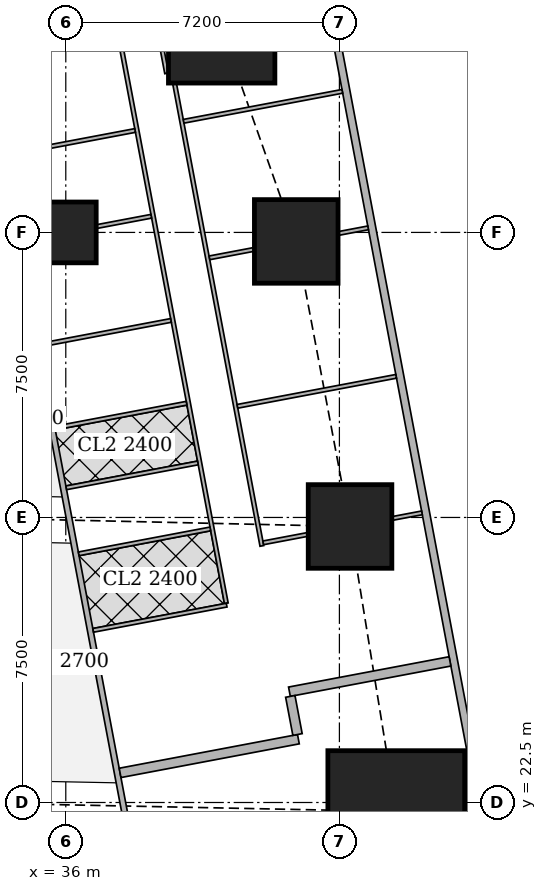
"""IFC4 building model, lengths in metres.
Left out: names, types, materials, properties, quantities, classifications, styles, units other than length and angle.
Written with IfcOpenShell. Run it as: python <this file> out.ifc"""

import sys

from ifc_helpers import new_model, si_unit, direction, frame, frame_2d, origin, origin_2d, place, context, subcontext, project, spatial, rectangle, extrude, element, fill, save


model = new_model("IFC4")
c1 = context("Model", 3, precision=1e-05, world=origin(), true_north=direction((0.0, 1.0)))
c2 = subcontext(c1, "Body", "Model", "MODEL_VIEW")
j1 = project(units=[si_unit("LENGTHUNIT", "METRE"), si_unit("PLANEANGLEUNIT", "RADIAN")], contexts=[c1])
p1 = place(None, origin())
s1 = spatial("IfcSite", under=j1, at=p1, CompositionType="ELEMENT")
p2 = place(p1, origin())
s2 = spatial("IfcBuilding", under=s1, at=p2, CompositionType="ELEMENT")
p3 = place(p2, frame((0.0, 0.0, 111.65)))
s3 = spatial("IfcBuildingStorey", under=s2, at=p3, CompositionType="ELEMENT", Elevation=111.65)
p4 = place(p3, frame((44.697, 22.263, 0.0), z_axis=(0.0, 0.0, 1.0), x_axis=(1.0, 0.0, 0.0)))
e1 = element("IfcColumn", 1, at=p4, inside=s3, PredefinedType="COLUMN", context=c2, shape_type="SweptSolid", body=[
    extrude(rectangle(XDim=3.6, YDim=3.2, at=origin_2d()), origin(), (0.0, 0.0, 1.0), 3.75),
])
p5 = place(p3, frame((43.48, 29.763, 0.0), z_axis=(0.0, 0.0, 1.0), x_axis=(1.0, 0.0, 0.0)))
e2 = element("IfcColumn", 2, at=p5, inside=s3, PredefinedType="COLUMN", context=c2, shape_type="SweptSolid", body=[
    extrude(rectangle(XDim=2.2, YDim=2.2, at=origin_2d()), origin(), (0.0, 0.0, 1.0), 3.75),
])
p6 = place(p3, frame((36.0, 37.5, 0.0), z_axis=(0.0, 0.0, 1.0), x_axis=(1.0, 0.0, 0.0)))
e3 = element("IfcColumn", 3, at=p6, inside=s3, PredefinedType="COLUMN", context=c2, shape_type="SweptSolid", body=[
    extrude(rectangle(XDim=1.6, YDim=1.6, at=origin_2d()), origin(), (0.0, 0.0, 1.0), 3.75),
])
p7 = place(p3, frame((42.064, 37.263, 0.0), z_axis=(0.0, 0.0, 1.0), x_axis=(1.0, 0.0, 0.0)))
e4 = element("IfcColumn", 4, at=p7, inside=s3, PredefinedType="COLUMN", context=c2, shape_type="SweptSolid", body=[
    extrude(rectangle(XDim=2.2, YDim=2.2, at=origin_2d()), origin(), (0.0, 0.0, 1.0), 3.75),
])
p8 = place(p3, frame((40.102, 42.83, 0.0), z_axis=(0.0, 0.0, 1.0), x_axis=(1.0, 0.0, 0.0)))
e5 = element("IfcColumn", 5, at=p8, inside=s3, PredefinedType="COLUMN", context=c2, shape_type="SweptSolid", body=[
    extrude(rectangle(XDim=2.8, YDim=2.8, at=origin_2d()), origin(), (0.0, 0.0, 1.0), 3.75),
])
p9 = place(p3, frame((50.653, 2.703, 0.0), z_axis=(0.0, 0.0, 1.0), x_axis=(-0.185612026696, 0.982623109613, 0.0)))
e6 = element("IfcWall", 6, at=p9, inside=s3, PredefinedType="SOLIDWALL", context=c2, shape_type="SweptSolid", body=[
    extrude(rectangle(XDim=41.393, YDim=0.2, at=frame_2d((20.697, 0.0))), origin(), (0.0, 0.0, 1.0), 3.5),
])
p10 = place(p9, frame((1.633, 0.0, 0.9)))
e7 = element("IfcOpeningElement", 7, at=p10, cuts=e6, PredefinedType="OPENING", context=c2, shape_type="SweptSolid", body=[
    extrude(rectangle(XDim=1.8, YDim=1.5, at=frame_2d((0.9, 0.75))), frame((0.0, 0.11, 0.0), z_axis=(0.0, -1.0, 0.0), x_axis=(1.0, 0.0, 0.0)), (0.0, 0.0, 1.0), 0.22),
])
p11 = place(p9, frame((6.032, 0.0, 0.9)))
e8 = element("IfcOpeningElement", 8, at=p11, cuts=e6, PredefinedType="OPENING", context=c2, shape_type="SweptSolid", body=[
    extrude(rectangle(XDim=1.8, YDim=1.5, at=frame_2d((0.9, 0.75))), frame((0.0, 0.11, 0.0), z_axis=(0.0, -1.0, 0.0), x_axis=(1.0, 0.0, 0.0)), (0.0, 0.0, 1.0), 0.22),
])
p12 = place(p9, frame((9.848, 0.0, 0.9)))
e9 = element("IfcOpeningElement", 9, at=p12, cuts=e6, PredefinedType="OPENING", context=c2, shape_type="SweptSolid", body=[
    extrude(rectangle(XDim=1.8, YDim=1.5, at=frame_2d((0.9, 0.75))), frame((0.0, 0.11, 0.0), z_axis=(0.0, -1.0, 0.0), x_axis=(1.0, 0.0, 0.0)), (0.0, 0.0, 1.0), 0.22),
])
p13 = place(p9, frame((13.664, 0.0, 0.9)))
e10 = element("IfcOpeningElement", 10, at=p13, cuts=e6, PredefinedType="OPENING", context=c2, shape_type="SweptSolid", body=[
    extrude(rectangle(XDim=1.8, YDim=1.5, at=frame_2d((0.9, 0.75))), frame((0.0, 0.11, 0.0), z_axis=(0.0, -1.0, 0.0), x_axis=(1.0, 0.0, 0.0)), (0.0, 0.0, 1.0), 0.22),
])
p14 = place(p9, frame((17.481, 0.0, 0.9)))
e11 = element("IfcOpeningElement", 11, at=p14, cuts=e6, PredefinedType="OPENING", context=c2, shape_type="SweptSolid", body=[
    extrude(rectangle(XDim=1.8, YDim=1.5, at=frame_2d((0.9, 0.75))), frame((0.0, 0.11, 0.0), z_axis=(0.0, -1.0, 0.0), x_axis=(1.0, 0.0, 0.0)), (0.0, 0.0, 1.0), 0.22),
])
p15 = place(p9, frame((21.297, 0.0, 0.9)))
e12 = element("IfcOpeningElement", 12, at=p15, cuts=e6, PredefinedType="OPENING", context=c2, shape_type="SweptSolid", body=[
    extrude(rectangle(XDim=1.8, YDim=1.5, at=frame_2d((0.9, 0.75))), frame((0.0, 0.11, 0.0), z_axis=(0.0, -1.0, 0.0), x_axis=(1.0, 0.0, 0.0)), (0.0, 0.0, 1.0), 0.22),
])
p16 = place(p9, frame((25.113, 0.0, 0.9)))
e13 = element("IfcOpeningElement", 13, at=p16, cuts=e6, PredefinedType="OPENING", context=c2, shape_type="SweptSolid", body=[
    extrude(rectangle(XDim=1.8, YDim=1.5, at=frame_2d((0.9, 0.75))), frame((0.0, 0.11, 0.0), z_axis=(0.0, -1.0, 0.0), x_axis=(1.0, 0.0, 0.0)), (0.0, 0.0, 1.0), 0.22),
])
p17 = place(p9, frame((28.93, 0.0, 0.9)))
e14 = element("IfcOpeningElement", 14, at=p17, cuts=e6, PredefinedType="OPENING", context=c2, shape_type="SweptSolid", body=[
    extrude(rectangle(XDim=1.8, YDim=1.5, at=frame_2d((0.9, 0.75))), frame((0.0, 0.11, 0.0), z_axis=(0.0, -1.0, 0.0), x_axis=(1.0, 0.0, 0.0)), (0.0, 0.0, 1.0), 0.22),
])
p18 = place(p9, frame((32.746, 0.0, 0.9)))
e15 = element("IfcOpeningElement", 15, at=p18, cuts=e6, PredefinedType="OPENING", context=c2, shape_type="SweptSolid", body=[
    extrude(rectangle(XDim=1.8, YDim=1.5, at=frame_2d((0.9, 0.75))), frame((0.0, 0.11, 0.0), z_axis=(0.0, -1.0, 0.0), x_axis=(1.0, 0.0, 0.0)), (0.0, 0.0, 1.0), 0.22),
])
p19 = place(p9, frame((36.481, 0.0, 0.9)))
e16 = element("IfcOpeningElement", 16, at=p19, cuts=e6, PredefinedType="OPENING", context=c2, shape_type="SweptSolid", body=[
    extrude(rectangle(XDim=1.8, YDim=1.5, at=frame_2d((0.9, 0.75))), frame((0.0, 0.11, 0.0), z_axis=(0.0, -1.0, 0.0), x_axis=(1.0, 0.0, 0.0)), (0.0, 0.0, 1.0), 0.22),
])
p20 = place(p3, frame((33.127, 45.65, 0.0), z_axis=(0.0, 0.0, 1.0), x_axis=(0.185598547723, -0.98262565562, 0.0)))
e17 = element("IfcWall", 17, at=p20, inside=s3, PredefinedType="SOLIDWALL", context=c2, shape_type="SweptSolid", body=[
    extrude(rectangle(XDim=47.118, YDim=0.15, at=frame_2d((23.559, 0.0))), origin(), (0.0, 0.0, 1.0), 2.2),
])
p21 = place(p20, frame((20.373, 0.0, 0.0)))
e18 = element("IfcOpeningElement", 18, at=p21, cuts=e17, PredefinedType="OPENING", context=c2, shape_type="SweptSolid", body=[
    extrude(rectangle(XDim=1.0, YDim=2.1, at=frame_2d((0.5, 1.05))), frame((0.0, 0.085, 0.0), z_axis=(0.0, -1.0, 0.0), x_axis=(1.0, 0.0, 0.0)), (0.0, 0.0, 1.0), 0.17),
])
p22 = place(p20, frame((24.188, 0.0, 0.0)))
e19 = element("IfcOpeningElement", 19, at=p22, cuts=e17, PredefinedType="OPENING", context=c2, shape_type="SweptSolid", body=[
    extrude(rectangle(XDim=1.0, YDim=2.1, at=frame_2d((0.5, 1.05))), frame((0.0, 0.085, 0.0), z_axis=(0.0, -1.0, 0.0), x_axis=(1.0, 0.0, 0.0)), (0.0, 0.0, 1.0), 0.17),
])
p23 = place(p20, frame((32.608, 0.0, 0.0)))
e20 = element("IfcOpeningElement", 20, at=p23, cuts=e17, PredefinedType="OPENING", context=c2, shape_type="SweptSolid", body=[
    extrude(rectangle(XDim=1.0, YDim=2.1, at=frame_2d((0.5, 1.05))), frame((0.0, 0.085, 0.0), z_axis=(0.0, -1.0, 0.0), x_axis=(1.0, 0.0, 0.0)), (0.0, 0.0, 1.0), 0.17),
])
p24 = place(p3, frame((38.654, 41.686, 0.0), z_axis=(0.0, 0.0, 1.0), x_axis=(-0.185676896978, 0.982610853761, 0.0)))
e21 = element("IfcWall", 21, at=p24, inside=s3, PredefinedType="PARTITIONING", context=c2, shape_type="SweptSolid", body=[
    extrude(rectangle(XDim=4.034, YDim=0.1, at=frame_2d((2.017, 0.0))), origin(), (0.0, 0.0, 1.0), 2.05),
])
p25 = place(p3, frame((38.862, 41.42, 0.0), z_axis=(0.0, 0.0, 1.0), x_axis=(0.185550092293, -0.982634806655, 0.0)))
e22 = element("IfcWall", 22, at=p25, inside=s3, PredefinedType="PARTITIONING", context=c2, shape_type="SweptSolid", body=[
    extrude(rectangle(XDim=12.384, YDim=0.1, at=frame_2d((6.192, 0.0))), origin(), (0.0, 0.0, 1.0), 2.5),
])
p26 = place(p25, frame((11.212, 0.0, 0.0)))
e23 = element("IfcOpeningElement", 23, at=p26, cuts=e22, PredefinedType="OPENING", context=c2, shape_type="SweptSolid", body=[
    extrude(rectangle(XDim=0.9, YDim=2.1, at=frame_2d((0.45, 1.05))), frame((0.0, 0.06, 0.0), z_axis=(0.0, -1.0, 0.0), x_axis=(1.0, 0.0, 0.0)), (0.0, 0.0, 1.0), 0.12),
])
p27 = place(p25, frame((7.555, 0.0, 0.0)))
e24 = element("IfcOpeningElement", 24, at=p27, cuts=e22, PredefinedType="OPENING", context=c2, shape_type="SweptSolid", body=[
    extrude(rectangle(XDim=0.9, YDim=2.1, at=frame_2d((0.45, 1.05))), frame((0.0, 0.06, 0.0), z_axis=(0.0, -1.0, 0.0), x_axis=(1.0, 0.0, 0.0)), (0.0, 0.0, 1.0), 0.12),
])
p28 = place(p25, frame((3.579, 0.0, 0.0)))
e25 = element("IfcOpeningElement", 25, at=p28, cuts=e22, PredefinedType="OPENING", context=c2, shape_type="SweptSolid", body=[
    extrude(rectangle(XDim=0.9, YDim=2.1, at=frame_2d((0.45, 1.05))), frame((0.0, 0.06, 0.0), z_axis=(0.0, -1.0, 0.0), x_axis=(1.0, 0.0, 0.0)), (0.0, 0.0, 1.0), 0.12),
])
p29 = place(p3, frame((37.473, 42.309, 0.0), z_axis=(0.0, 0.0, 1.0), x_axis=(0.185583982986, -0.982628406499, 0.0)))
e26 = element("IfcWall", 26, at=p29, inside=s3, PredefinedType="PARTITIONING", context=c2, shape_type="SweptSolid", body=[
    extrude(rectangle(XDim=14.825, YDim=0.1, at=frame_2d((7.412, 0.0))), origin(), (0.0, 0.0, 1.0), 2.5),
])
p30 = place(p29, frame((13.4, 0.0, 0.0)))
e27 = element("IfcOpeningElement", 27, at=p30, cuts=e26, PredefinedType="OPENING", context=c2, shape_type="SweptSolid", body=[
    extrude(rectangle(XDim=0.9, YDim=2.1, at=frame_2d((0.45, 1.05))), frame((0.0, 0.06, 0.0), z_axis=(0.0, -1.0, 0.0), x_axis=(1.0, 0.0, 0.0)), (0.0, 0.0, 1.0), 0.12),
])
p31 = place(p29, frame((9.808, 0.0, 0.0)))
e28 = element("IfcOpeningElement", 28, at=p31, cuts=e26, PredefinedType="OPENING", context=c2, shape_type="SweptSolid", body=[
    extrude(rectangle(XDim=0.9, YDim=2.1, at=frame_2d((0.45, 1.05))), frame((0.0, 0.06, 0.0), z_axis=(0.0, -1.0, 0.0), x_axis=(1.0, 0.0, 0.0)), (0.0, 0.0, 1.0), 0.12),
])
p32 = place(p29, frame((5.397, 0.0, 0.0)))
e29 = element("IfcOpeningElement", 29, at=p32, cuts=e26, PredefinedType="OPENING", context=c2, shape_type="SweptSolid", body=[
    extrude(rectangle(XDim=0.9, YDim=2.1, at=frame_2d((0.45, 1.05))), frame((0.0, 0.06, 0.0), z_axis=(0.0, -1.0, 0.0), x_axis=(1.0, 0.0, 0.0)), (0.0, 0.0, 1.0), 0.12),
])
p33 = place(p29, frame((2.853, 0.0, 0.0)))
e30 = element("IfcOpeningElement", 30, at=p33, cuts=e26, PredefinedType="OPENING", context=c2, shape_type="SweptSolid", body=[
    extrude(rectangle(XDim=0.9, YDim=2.1, at=frame_2d((0.45, 1.05))), frame((0.0, 0.06, 0.0), z_axis=(0.0, -1.0, 0.0), x_axis=(1.0, 0.0, 0.0)), (0.0, 0.0, 1.0), 0.12),
])
p34 = place(p29, frame((11.491, 0.0, 0.0)))
e31 = element("IfcOpeningElement", 31, at=p34, cuts=e26, PredefinedType="OPENING", context=c2, shape_type="SweptSolid", body=[
    extrude(rectangle(XDim=0.9, YDim=2.1, at=frame_2d((0.45, 1.05))), frame((0.0, 0.06, 0.0), z_axis=(0.0, -1.0, 0.0), x_axis=(1.0, 0.0, 0.0)), (0.0, 0.0, 1.0), 0.12),
])
p35 = place(p29, frame((7.9, 0.0, 0.0)))
e32 = element("IfcOpeningElement", 32, at=p35, cuts=e26, PredefinedType="OPENING", context=c2, shape_type="SweptSolid", body=[
    extrude(rectangle(XDim=0.9, YDim=2.1, at=frame_2d((0.45, 1.05))), frame((0.0, 0.06, 0.0), z_axis=(0.0, -1.0, 0.0), x_axis=(1.0, 0.0, 0.0)), (0.0, 0.0, 1.0), 0.12),
])
p36 = place(p3, frame((43.277, 41.212, 0.0), z_axis=(0.0, 0.0, 1.0), x_axis=(-0.982665405803, -0.185387972203, 0.0)))
e33 = element("IfcWall", 33, at=p36, inside=s3, PredefinedType="PARTITIONING", context=c2, shape_type="SweptSolid", body=[
    extrude(rectangle(XDim=4.25, YDim=0.1, at=frame_2d((2.125, 0.0))), origin(), (0.0, 0.0, 1.0), 2.05),
])
p37 = place(p3, frame((43.955, 37.62, 0.0), z_axis=(0.0, 0.0, 1.0), x_axis=(-0.98247004097, -0.186420542316, 0.0)))
e34 = element("IfcWall", 34, at=p37, inside=s3, PredefinedType="PARTITIONING", context=c2, shape_type="SweptSolid", body=[
    extrude(rectangle(XDim=0.795, YDim=0.1, at=frame_2d((0.397, 0.0))), origin(), (0.0, 0.0, 1.0), 2.05),
])
p38 = place(p3, frame((40.954, 37.053, 0.0), z_axis=(0.0, 0.0, 1.0), x_axis=(-0.982600492424, -0.185731721275, 0.0)))
e35 = element("IfcWall", 35, at=p38, inside=s3, PredefinedType="PARTITIONING", context=c2, shape_type="SweptSolid", body=[
    extrude(rectangle(XDim=1.195, YDim=0.1, at=frame_2d((0.597, 0.0))), origin(), (0.0, 0.0, 1.0), 2.05),
])
p39 = place(p3, frame((44.693, 33.713, 0.0), z_axis=(0.0, 0.0, 1.0), x_axis=(-0.982623519589, -0.185609856287, 0.0)))
e36 = element("IfcWall", 36, at=p39, inside=s3, PredefinedType="PARTITIONING", context=c2, shape_type="SweptSolid", body=[
    extrude(rectangle(XDim=4.25, YDim=0.1, at=frame_2d((2.125, 0.0))), origin(), (0.0, 0.0, 1.0), 2.2),
])
p40 = place(p3, frame((45.372, 30.121, 0.0), z_axis=(0.0, 0.0, 1.0), x_axis=(-0.982512656401, -0.186195810938, 0.0)))
e37 = element("IfcWall", 37, at=p40, inside=s3, PredefinedType="PARTITIONING", context=c2, shape_type="SweptSolid", body=[
    extrude(rectangle(XDim=0.796, YDim=0.1, at=frame_2d((0.398, 0.0))), origin(), (0.0, 0.0, 1.0), 3.5),
])
p41 = place(p3, frame((42.37, 29.554, 0.0), z_axis=(0.0, 0.0, 1.0), x_axis=(-0.982600492424, -0.185731721275, 0.0)))
e38 = element("IfcWall", 38, at=p41, inside=s3, PredefinedType="PARTITIONING", context=c2, shape_type="SweptSolid", body=[
    extrude(rectangle(XDim=1.195, YDim=0.1, at=frame_2d((0.597, 0.0))), origin(), (0.0, 0.0, 1.0), 2.5),
])
p42 = place(p3, frame((37.824, 40.182, 0.0), z_axis=(0.0, 0.0, 1.0), x_axis=(-0.982648794755, -0.185475998897, 0.0)))
e39 = element("IfcWall", 39, at=p42, inside=s3, PredefinedType="PARTITIONING", context=c2, shape_type="SweptSolid", body=[
    extrude(rectangle(XDim=3.525, YDim=0.1, at=frame_2d((1.763, 0.0))), origin(), (0.0, 0.0, 1.0), 3.5),
])
p43 = place(p3, frame((38.25, 37.925, 0.0), z_axis=(0.0, 0.0, 1.0), x_axis=(-0.982626127294, -0.185596050493, 0.0)))
e40 = element("IfcWall", 40, at=p43, inside=s3, PredefinedType="PARTITIONING", context=c2, shape_type="SweptSolid", body=[
    extrude(rectangle(XDim=1.465, YDim=0.1, at=frame_2d((0.733, 0.0))), origin(), (0.0, 0.0, 1.0), 3.5),
])
p44 = place(p3, frame((39.476, 31.434, 0.0), z_axis=(0.0, 0.0, 1.0), x_axis=(-0.982638553676, -0.185530247748, 0.0)))
e41 = element("IfcWall", 41, at=p44, inside=s3, PredefinedType="PARTITIONING", context=c2, shape_type="SweptSolid", body=[
    extrude(rectangle(XDim=3.525, YDim=0.1, at=frame_2d((1.763, 0.0))), origin(), (0.0, 0.0, 1.0), 3.5),
])
p45 = place(p3, frame((40.233, 27.693, 0.0), z_axis=(0.0, 0.0, 1.0), x_axis=(-0.982598214409, -0.185743772548, 0.0)))
e42 = element("IfcWall", 42, at=p45, inside=s3, PredefinedType="PARTITIONING", context=c2, shape_type="SweptSolid", body=[
    extrude(rectangle(XDim=3.575, YDim=0.1, at=frame_2d((1.788, 0.0))), origin(), (0.0, 0.0, 1.0), 3.5),
])
p46 = place(p3, frame((38.768, 35.184, 0.0), z_axis=(0.0, 0.0, 1.0), x_axis=(-0.982588017646, -0.185797706064, 0.0)))
e43 = element("IfcWall", 43, at=p46, inside=s3, PredefinedType="PARTITIONING", context=c2, shape_type="SweptSolid", body=[
    extrude(rectangle(XDim=3.525, YDim=0.1, at=frame_2d((1.763, 0.0))), origin(), (0.0, 0.0, 1.0), 3.5),
])
p47 = place(p3, frame((39.803, 29.698, 0.0), z_axis=(0.0, 0.0, 1.0), x_axis=(-0.982576058723, -0.185860939478, 0.0)))
e44 = element("IfcWall", 44, at=p47, inside=s3, PredefinedType="PARTITIONING", context=c2, shape_type="SweptSolid", body=[
    extrude(rectangle(XDim=3.524, YDim=0.1, at=frame_2d((1.762, 0.0))), origin(), (0.0, 0.0, 1.0), 2.5),
])
p48 = place(p3, frame((39.179, 33.006, 0.0), z_axis=(0.0, 0.0, 1.0), x_axis=(-0.982636169624, -0.185542874149, 0.0)))
e45 = element("IfcWall", 45, at=p48, inside=s3, PredefinedType="PARTITIONING", context=c2, shape_type="SweptSolid", body=[
    extrude(rectangle(XDim=3.525, YDim=0.1, at=frame_2d((1.763, 0.0))), origin(), (0.0, 0.0, 1.0), 3.5),
])
p49 = place(p3, frame((46.782, 22.657, 0.0), z_axis=(0.0, 0.0, 1.0), x_axis=(-0.982574553168, -0.185868898601, 0.0)))
e46 = element("IfcWall", 46, at=p49, inside=s3, PredefinedType="PARTITIONING", context=c2, shape_type="SweptSolid", body=[
    extrude(rectangle(XDim=0.28, YDim=0.1, at=frame_2d((0.14, 0.0))), origin(), (0.0, 0.0, 1.0), 3.5),
])
p50 = place(p3, frame((46.11, 26.213, 0.0), z_axis=(0.0, 0.0, 1.0), x_axis=(-0.982633535512, -0.185556823879, 0.0)))
e47 = element("IfcWall", 47, at=p50, inside=s3, PredefinedType="SOLIDWALL", context=c2, shape_type="SweptSolid", body=[
    extrude(rectangle(XDim=4.3, YDim=0.25, at=frame_2d((2.15, 0.0))), origin(), (0.0, 0.0, 1.0), 2.2),
])
p51 = place(p3, frame((42.121, 24.166, 0.0), z_axis=(0.0, 0.0, 1.0), x_axis=(-0.98259850169, -0.185742252804, 0.0)))
e48 = element("IfcWall", 48, at=p51, inside=s3, PredefinedType="SOLIDWALL", context=c2, shape_type="SweptSolid", body=[
    extrude(rectangle(XDim=4.775, YDim=0.25, at=frame_2d((2.388, 0.0))), origin(), (0.0, 0.0, 1.0), 3.5),
])
p52 = place(p3, frame((41.908, 25.292, 0.0), z_axis=(0.0, 0.0, 1.0), x_axis=(0.18607888991, -0.982534806879, 0.0)))
e49 = element("IfcWall", 49, at=p52, inside=s3, PredefinedType="SOLIDWALL", context=c2, shape_type="SweptSolid", body=[
    extrude(rectangle(XDim=1.021, YDim=0.25, at=frame_2d((0.51, 0.0))), origin(), (0.0, 0.0, 1.0), 3.5),
])
p53 = place(p15, origin())
e50 = element("IfcWindow", 50, at=p53, inside=s3, PartitioningType="SINGLE_PANEL", PredefinedType="WINDOW", context=c2, shape_type="SweptSolid", body=[
    extrude(rectangle(XDim=1.8, YDim=1.5, at=frame_2d((0.9, 0.75))), frame((0.0, 0.03, 0.0), z_axis=(0.0, -1.0, 0.0), x_axis=(1.0, 0.0, 0.0)), (0.0, 0.0, 1.0), 0.06),
])
fill(e12, e50)
p54 = place(p16, origin())
e51 = element("IfcWindow", 51, at=p54, inside=s3, PartitioningType="SINGLE_PANEL", PredefinedType="WINDOW", context=c2, shape_type="SweptSolid", body=[
    extrude(rectangle(XDim=1.8, YDim=1.5, at=frame_2d((0.9, 0.75))), frame((0.0, 0.03, 0.0), z_axis=(0.0, -1.0, 0.0), x_axis=(1.0, 0.0, 0.0)), (0.0, 0.0, 1.0), 0.06),
])
fill(e13, e51)
p55 = place(p17, origin())
e52 = element("IfcWindow", 52, at=p55, inside=s3, PartitioningType="SINGLE_PANEL", PredefinedType="WINDOW", context=c2, shape_type="SweptSolid", body=[
    extrude(rectangle(XDim=1.8, YDim=1.5, at=frame_2d((0.9, 0.75))), frame((0.0, 0.03, 0.0), z_axis=(0.0, -1.0, 0.0), x_axis=(1.0, 0.0, 0.0)), (0.0, 0.0, 1.0), 0.06),
])
fill(e14, e52)
p56 = place(p18, origin())
e53 = element("IfcWindow", 53, at=p56, inside=s3, PartitioningType="SINGLE_PANEL", PredefinedType="WINDOW", context=c2, shape_type="SweptSolid", body=[
    extrude(rectangle(XDim=1.8, YDim=1.5, at=frame_2d((0.9, 0.75))), frame((0.0, 0.03, 0.0), z_axis=(0.0, -1.0, 0.0), x_axis=(1.0, 0.0, 0.0)), (0.0, 0.0, 1.0), 0.06),
])
fill(e15, e53)
p57 = place(p19, origin())
e54 = element("IfcWindow", 54, at=p57, inside=s3, PartitioningType="SINGLE_PANEL", PredefinedType="WINDOW", context=c2, shape_type="SweptSolid", body=[
    extrude(rectangle(XDim=1.8, YDim=1.5, at=frame_2d((0.9, 0.75))), frame((0.0, 0.03, 0.0), z_axis=(0.0, -1.0, 0.0), x_axis=(1.0, 0.0, 0.0)), (0.0, 0.0, 1.0), 0.06),
])
fill(e16, e54)
p58 = place(p26, origin())
e55 = element("IfcDoor", 55, at=p58, inside=s3, OperationType="SINGLE_SWING_RIGHT", PredefinedType="DOOR", context=c2, shape_type="SweptSolid", body=[
    extrude(rectangle(XDim=0.9, YDim=2.1, at=frame_2d((0.45, 1.05))), frame((0.0, 0.025, 0.0), z_axis=(0.0, -1.0, 0.0), x_axis=(1.0, 0.0, 0.0)), (0.0, 0.0, 1.0), 0.05),
])
fill(e23, e55)
p59 = place(p27, origin())
e56 = element("IfcDoor", 56, at=p59, inside=s3, OperationType="SINGLE_SWING_RIGHT", PredefinedType="DOOR", context=c2, shape_type="SweptSolid", body=[
    extrude(rectangle(XDim=0.9, YDim=2.1, at=frame_2d((0.45, 1.05))), frame((0.0, 0.025, 0.0), z_axis=(0.0, -1.0, 0.0), x_axis=(1.0, 0.0, 0.0)), (0.0, 0.0, 1.0), 0.05),
])
fill(e24, e56)
p60 = place(p28, origin())
e57 = element("IfcDoor", 57, at=p60, inside=s3, OperationType="SINGLE_SWING_RIGHT", PredefinedType="DOOR", context=c2, shape_type="SweptSolid", body=[
    extrude(rectangle(XDim=0.9, YDim=2.1, at=frame_2d((0.45, 1.05))), frame((0.0, 0.025, 0.0), z_axis=(0.0, -1.0, 0.0), x_axis=(1.0, 0.0, 0.0)), (0.0, 0.0, 1.0), 0.05),
])
fill(e25, e57)
p61 = place(p30, origin())
e58 = element("IfcDoor", 58, at=p61, inside=s3, OperationType="SINGLE_SWING_LEFT", PredefinedType="DOOR", context=c2, shape_type="SweptSolid", body=[
    extrude(rectangle(XDim=0.9, YDim=2.1, at=frame_2d((0.45, 1.05))), frame((0.0, 0.025, 0.0), z_axis=(0.0, -1.0, 0.0), x_axis=(1.0, 0.0, 0.0)), (0.0, 0.0, 1.0), 0.05),
])
fill(e27, e58)
p62 = place(p31, origin())
e59 = element("IfcDoor", 59, at=p62, inside=s3, OperationType="SINGLE_SWING_LEFT", PredefinedType="DOOR", context=c2, shape_type="SweptSolid", body=[
    extrude(rectangle(XDim=0.9, YDim=2.1, at=frame_2d((0.45, 1.05))), frame((0.0, 0.025, 0.0), z_axis=(0.0, -1.0, 0.0), x_axis=(1.0, 0.0, 0.0)), (0.0, 0.0, 1.0), 0.05),
])
fill(e28, e59)
p63 = place(p32, origin())
e60 = element("IfcDoor", 60, at=p63, inside=s3, OperationType="SINGLE_SWING_LEFT", PredefinedType="DOOR", context=c2, shape_type="SweptSolid", body=[
    extrude(rectangle(XDim=0.9, YDim=2.1, at=frame_2d((0.45, 1.05))), frame((0.0, 0.025, 0.0), z_axis=(0.0, -1.0, 0.0), x_axis=(1.0, 0.0, 0.0)), (0.0, 0.0, 1.0), 0.05),
])
fill(e29, e60)
p64 = place(p33, origin())
e61 = element("IfcDoor", 61, at=p64, inside=s3, OperationType="SINGLE_SWING_RIGHT", PredefinedType="DOOR", context=c2, shape_type="SweptSolid", body=[
    extrude(rectangle(XDim=0.9, YDim=2.1, at=frame_2d((0.45, 1.05))), frame((0.0, 0.025, 0.0), z_axis=(0.0, -1.0, 0.0), x_axis=(1.0, 0.0, 0.0)), (0.0, 0.0, 1.0), 0.05),
])
fill(e30, e61)
p65 = place(p34, origin())
e62 = element("IfcDoor", 62, at=p65, inside=s3, OperationType="SINGLE_SWING_RIGHT", PredefinedType="DOOR", context=c2, shape_type="SweptSolid", body=[
    extrude(rectangle(XDim=0.9, YDim=2.1, at=frame_2d((0.45, 1.05))), frame((0.0, 0.025, 0.0), z_axis=(0.0, -1.0, 0.0), x_axis=(1.0, 0.0, 0.0)), (0.0, 0.0, 1.0), 0.05),
])
fill(e31, e62)
p66 = place(p35, origin())
e63 = element("IfcDoor", 63, at=p66, inside=s3, OperationType="SINGLE_SWING_RIGHT", PredefinedType="DOOR", context=c2, shape_type="SweptSolid", body=[
    extrude(rectangle(XDim=0.9, YDim=2.1, at=frame_2d((0.45, 1.05))), frame((0.0, 0.025, 0.0), z_axis=(0.0, -1.0, 0.0), x_axis=(1.0, 0.0, 0.0)), (0.0, 0.0, 1.0), 0.05),
])
fill(e32, e63)
p67 = place(p21, origin())
e64 = element("IfcDoor", 64, at=p67, inside=s3, OperationType="SINGLE_SWING_LEFT", PredefinedType="DOOR", context=c2, shape_type="SweptSolid", body=[
    extrude(rectangle(XDim=1.0, YDim=2.1, at=frame_2d((0.5, 1.05))), frame((0.0, 0.025, 0.0), z_axis=(0.0, -1.0, 0.0), x_axis=(1.0, 0.0, 0.0)), (0.0, 0.0, 1.0), 0.05),
])
fill(e18, e64)
save(model, sys.argv[1])
